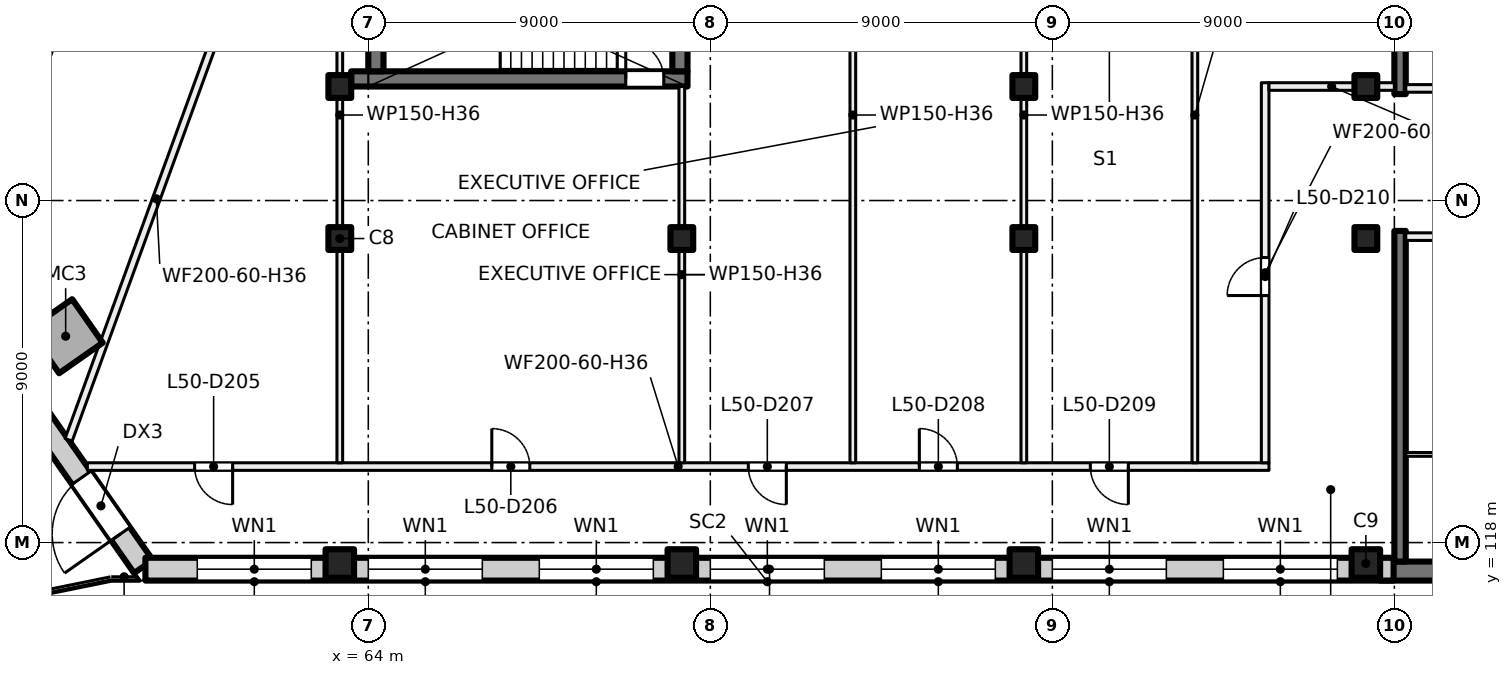
"""IFC4 building model, lengths in metres.
Left out: names, types, materials, properties, quantities, classifications, styles, units other than length and angle.
Written with IfcOpenShell. Run it as: python <this file> out.ifc"""

import sys

from ifc_helpers import new_model, si_unit, direction, frame, frame_2d, origin, origin_2d, place, context, subcontext, project, spatial, rectangle, hollow_rectangle, extrude, element, fill, save


model = new_model("IFC4")
c1 = context("Model", 3, precision=1e-05, world=origin(), true_north=direction((0.0, 1.0)))
c2 = subcontext(c1, "Body", "Model", "MODEL_VIEW")
j1 = project(units=[si_unit("LENGTHUNIT", "METRE"), si_unit("PLANEANGLEUNIT", "RADIAN")], contexts=[c1])
p1 = place(None, origin())
s1 = spatial("IfcSite", under=j1, at=p1, CompositionType="ELEMENT")
p2 = place(p1, origin())
s2 = spatial("IfcBuilding", under=s1, at=p2, CompositionType="ELEMENT")
p3 = place(p2, frame((0.0, 0.0, 212.0)))
s3 = spatial("IfcBuildingStorey", under=s2, at=p3, CompositionType="ELEMENT", Elevation=212.0)
p4 = place(p3, frame((56.036, 123.43, 0.0), z_axis=(0.0, 0.0, 1.0), x_axis=(0.573576436351, -0.819152044289, 0.0)))
e1 = element("IfcColumn", 1, at=p4, inside=s3, PredefinedType="COLUMN", context=c2, shape_type="SweptSolid", body=[
    extrude(hollow_rectangle(XDim=1.4, YDim=1.4, WallThickness=0.032, at=origin_2d()), origin(), (0.0, 0.0, 1.0), 4.0),
])
for number, where, z_axis, x_axis in (
    (2, (63.25, 130.0, 0.0), (0.0, 0.0, 1.0), (1.0, 0.0, 0.0)),
    (3, (81.25, 130.0, 0.0), (0.0, 0.0, 1.0), (1.0, 0.0, 0.0)),
    (4, (90.25, 130.0, 0.0), (0.0, 0.0, 1.0), (1.0, 0.0, 0.0)),
    (5, (63.25, 126.0, 0.0), (0.0, 0.0, 1.0), (1.0, 0.0, 0.0)),
    (6, (72.25, 126.0, 0.0), (0.0, 0.0, 1.0), (1.0, 0.0, 0.0)),
    (7, (81.25, 126.0, 0.0), (0.0, 0.0, 1.0), (1.0, 0.0, 0.0)),
    (8, (90.25, 126.0, 0.0), (0.0, 0.0, 1.0), (1.0, 0.0, 0.0)),
):
    element("IfcColumn", number, at=place(p3, frame(where, z_axis=z_axis, x_axis=x_axis)), inside=s3, PredefinedType="COLUMN", context=c2, shape_type="SweptSolid", body=[
        extrude(rectangle(XDim=0.6, YDim=0.6, at=origin_2d()), origin(), (0.0, 0.0, 1.0), 4.0),
    ])
for number, where, z_axis, x_axis in (
    (9, (63.25, 117.45, 0.0), (0.0, 0.0, 1.0), (1.0, 0.0, 0.0)),
    (10, (72.25, 117.45, 0.0), (0.0, 0.0, 1.0), (1.0, 0.0, 0.0)),
    (11, (81.25, 117.45, 0.0), (0.0, 0.0, 1.0), (1.0, 0.0, 0.0)),
    (12, (90.25, 117.45, 0.0), (0.0, 0.0, 1.0), (1.0, 0.0, 0.0)),
):
    element("IfcColumn", number, at=place(p3, frame(where, z_axis=z_axis, x_axis=x_axis)), inside=s3, PredefinedType="COLUMN", context=c2, shape_type="SweptSolid", body=[
        extrude(rectangle(XDim=0.75, YDim=0.75, at=origin_2d()), origin(), (0.0, 0.0, 1.0), 4.0),
    ])
p5 = place(p3, frame((99.6, 117.25, 0.0), z_axis=(0.0, 0.0, 1.0), x_axis=(-1.0, 0.0, 0.0)))
e13 = element("IfcWall", 13, at=p5, inside=s3, PredefinedType="SHEAR", context=c2, shape_type="SweptSolid", body=[
    extrude(rectangle(XDim=8.975, YDim=0.5, at=frame_2d((4.488, 0.0))), origin(), (0.0, 0.0, 1.0), 4.0),
])
for number, where, z_axis, x_axis in (
    (14, (91.15, 138.5, 0.0), (0.0, 0.0, 1.0), (0.0, -1.0, 0.0)),
    (15, (91.15, 126.2, 0.0), (0.0, 0.0, 1.0), (0.0, -1.0, 0.0)),
):
    element("IfcWall", number, at=place(p3, frame(where, z_axis=z_axis, x_axis=x_axis)), inside=s3, PredefinedType="SHEAR", context=c2, shape_type="SweptSolid", body=[
        extrude(rectangle(XDim=8.7, YDim=0.3, at=frame_2d((4.35, 0.0))), origin(), (0.0, 0.0, 1.0), 4.0),
    ])
p6 = place(p3, frame((63.55, 130.2, 0.0), z_axis=(0.0, 0.0, 1.0), x_axis=(1.0, 0.0, 0.0)))
e16 = element("IfcWall", 16, at=p6, inside=s3, PredefinedType="SHEAR", context=c2, shape_type="SweptSolid", body=[
    extrude(rectangle(XDim=8.85, YDim=0.4, at=frame_2d((4.425, 0.0))), origin(), (0.0, 0.0, 1.0), 4.0),
])
p7 = place(p6, frame((7.225, 0.0, 0.0)))
e17 = element("IfcOpeningElement", 17, at=p7, cuts=e16, PredefinedType="OPENING", context=c2, shape_type="SweptSolid", body=[
    extrude(rectangle(XDim=1.0, YDim=2.1, at=frame_2d((0.5, 1.05))), frame((0.0, 0.21, 0.0), z_axis=(0.0, -1.0, 0.0), x_axis=(1.0, 0.0, 0.0)), (0.0, 0.0, 1.0), 0.42),
])
for number, where, z_axis, x_axis in (
    (18, (64.2, 130.4, 0.0), (0.0, 0.0, 1.0), (0.0, 1.0, 0.0)),
    (19, (72.2, 130.4, 0.0), (0.0, 0.0, 1.0), (0.0, 1.0, 0.0)),
):
    element("IfcWall", number, at=place(p3, frame(where, z_axis=z_axis, x_axis=x_axis)), inside=s3, PredefinedType="SHEAR", context=c2, shape_type="SweptSolid", body=[
        extrude(rectangle(XDim=3.0, YDim=0.4, at=frame_2d((1.5, 0.0))), origin(), (0.0, 0.0, 1.0), 4.0),
    ])
p8 = place(p3, frame((58.083, 117.369, 0.0), z_axis=(0.0, 0.0, 1.0), x_axis=(-0.573573095716, 0.819154383416, 0.0)))
e20 = element("IfcWall", 20, at=p8, inside=s3, PredefinedType="SOLIDWALL", context=c2, shape_type="SweptSolid", body=[
    extrude(rectangle(XDim=26.037, YDim=0.6, at=frame_2d((13.019, 0.0))), origin(), (0.0, 0.0, 1.0), 3.625),
])
p9 = place(p8, frame((1.05, 0.0, 0.0)))
e21 = element("IfcOpeningElement", 21, at=p9, cuts=e20, PredefinedType="OPENING", context=c2, shape_type="SweptSolid", body=[
    extrude(rectangle(XDim=1.8, YDim=2.4, at=frame_2d((0.9, 1.2))), frame((0.0, 0.31, 0.0), z_axis=(0.0, -1.0, 0.0), x_axis=(1.0, 0.0, 0.0)), (0.0, 0.0, 1.0), 0.62),
])
p10 = place(p8, frame((4.829, 0.0, 0.9)))
e22 = element("IfcOpeningElement", 22, at=p10, cuts=e20, PredefinedType="OPENING", context=c2, shape_type="SweptSolid", body=[
    extrude(rectangle(XDim=3.0, YDim=2.4, at=frame_2d((1.5, 1.2))), frame((0.0, 0.31, 0.0), z_axis=(0.0, -1.0, 0.0), x_axis=(1.0, 0.0, 0.0)), (0.0, 0.0, 1.0), 0.62),
])
p11 = place(p8, frame((9.209, 0.0, 0.9)))
e23 = element("IfcOpeningElement", 23, at=p11, cuts=e20, PredefinedType="OPENING", context=c2, shape_type="SweptSolid", body=[
    extrude(rectangle(XDim=3.0, YDim=2.4, at=frame_2d((1.5, 1.2))), frame((0.0, 0.31, 0.0), z_axis=(0.0, -1.0, 0.0), x_axis=(1.0, 0.0, 0.0)), (0.0, 0.0, 1.0), 0.62),
])
p12 = place(p8, frame((13.588, 0.0, 0.9)))
e24 = element("IfcOpeningElement", 24, at=p12, cuts=e20, PredefinedType="OPENING", context=c2, shape_type="SweptSolid", body=[
    extrude(rectangle(XDim=3.0, YDim=2.4, at=frame_2d((1.5, 1.2))), frame((0.0, 0.31, 0.0), z_axis=(0.0, -1.0, 0.0), x_axis=(1.0, 0.0, 0.0)), (0.0, 0.0, 1.0), 0.62),
])
p13 = place(p8, frame((17.968, 0.0, 0.9)))
e25 = element("IfcOpeningElement", 25, at=p13, cuts=e20, PredefinedType="OPENING", context=c2, shape_type="SweptSolid", body=[
    extrude(rectangle(XDim=3.0, YDim=2.4, at=frame_2d((1.5, 1.2))), frame((0.0, 0.31, 0.0), z_axis=(0.0, -1.0, 0.0), x_axis=(1.0, 0.0, 0.0)), (0.0, 0.0, 1.0), 0.62),
])
p14 = place(p8, frame((22.198, 0.0, 0.9)))
e26 = element("IfcOpeningElement", 26, at=p14, cuts=e20, PredefinedType="OPENING", context=c2, shape_type="SweptSolid", body=[
    extrude(rectangle(XDim=3.0, YDim=2.4, at=frame_2d((1.5, 1.2))), frame((0.0, 0.31, 0.0), z_axis=(0.0, -1.0, 0.0), x_axis=(1.0, 0.0, 0.0)), (0.0, 0.0, 1.0), 0.62),
])
p15 = place(p3, frame((90.98, 117.3, 0.0), z_axis=(0.0, 0.0, 1.0), x_axis=(-1.0, 0.0, 0.0)))
e27 = element("IfcWall", 27, at=p15, inside=s3, PredefinedType="SOLIDWALL", context=c2, shape_type="SweptSolid", body=[
    extrude(rectangle(XDim=32.845, YDim=0.6, at=frame_2d((16.422, 0.0))), origin(), (0.0, 0.0, 1.0), 3.625),
])
p16 = place(p15, frame((1.48, 0.0, 0.9)))
e28 = element("IfcOpeningElement", 28, at=p16, cuts=e27, PredefinedType="OPENING", context=c2, shape_type="SweptSolid", body=[
    extrude(rectangle(XDim=3.0, YDim=2.4, at=frame_2d((1.5, 1.2))), frame((0.0, 0.31, 0.0), z_axis=(0.0, -1.0, 0.0), x_axis=(1.0, 0.0, 0.0)), (0.0, 0.0, 1.0), 0.62),
])
p17 = place(p15, frame((5.98, 0.0, 0.9)))
e29 = element("IfcOpeningElement", 29, at=p17, cuts=e27, PredefinedType="OPENING", context=c2, shape_type="SweptSolid", body=[
    extrude(rectangle(XDim=3.0, YDim=2.4, at=frame_2d((1.5, 1.2))), frame((0.0, 0.31, 0.0), z_axis=(0.0, -1.0, 0.0), x_axis=(1.0, 0.0, 0.0)), (0.0, 0.0, 1.0), 0.62),
])
p18 = place(p15, frame((10.48, 0.0, 0.9)))
e30 = element("IfcOpeningElement", 30, at=p18, cuts=e27, PredefinedType="OPENING", context=c2, shape_type="SweptSolid", body=[
    extrude(rectangle(XDim=3.0, YDim=2.4, at=frame_2d((1.5, 1.2))), frame((0.0, 0.31, 0.0), z_axis=(0.0, -1.0, 0.0), x_axis=(1.0, 0.0, 0.0)), (0.0, 0.0, 1.0), 0.62),
])
p19 = place(p15, frame((14.98, 0.0, 0.9)))
e31 = element("IfcOpeningElement", 31, at=p19, cuts=e27, PredefinedType="OPENING", context=c2, shape_type="SweptSolid", body=[
    extrude(rectangle(XDim=3.0, YDim=2.4, at=frame_2d((1.5, 1.2))), frame((0.0, 0.31, 0.0), z_axis=(0.0, -1.0, 0.0), x_axis=(1.0, 0.0, 0.0)), (0.0, 0.0, 1.0), 0.62),
])
p20 = place(p15, frame((19.48, 0.0, 0.9)))
e32 = element("IfcOpeningElement", 32, at=p20, cuts=e27, PredefinedType="OPENING", context=c2, shape_type="SweptSolid", body=[
    extrude(rectangle(XDim=3.0, YDim=2.4, at=frame_2d((1.5, 1.2))), frame((0.0, 0.31, 0.0), z_axis=(0.0, -1.0, 0.0), x_axis=(1.0, 0.0, 0.0)), (0.0, 0.0, 1.0), 0.62),
])
p21 = place(p15, frame((23.98, 0.0, 0.9)))
e33 = element("IfcOpeningElement", 33, at=p21, cuts=e27, PredefinedType="OPENING", context=c2, shape_type="SweptSolid", body=[
    extrude(rectangle(XDim=3.0, YDim=2.4, at=frame_2d((1.5, 1.2))), frame((0.0, 0.31, 0.0), z_axis=(0.0, -1.0, 0.0), x_axis=(1.0, 0.0, 0.0)), (0.0, 0.0, 1.0), 0.62),
])
p22 = place(p15, frame((28.48, 0.0, 0.9)))
e34 = element("IfcOpeningElement", 34, at=p22, cuts=e27, PredefinedType="OPENING", context=c2, shape_type="SweptSolid", body=[
    extrude(rectangle(XDim=3.0, YDim=2.4, at=frame_2d((1.5, 1.2))), frame((0.0, 0.31, 0.0), z_axis=(0.0, -1.0, 0.0), x_axis=(1.0, 0.0, 0.0)), (0.0, 0.0, 1.0), 0.62),
])
p23 = place(p3, frame((95.25, 126.05, 0.0), z_axis=(0.0, 0.0, 1.0), x_axis=(-1.0, 0.0, 0.0)))
e35 = element("IfcWall", 35, at=p23, inside=s3, PredefinedType="PARTITIONING", context=c2, shape_type="SweptSolid", body=[
    extrude(rectangle(XDim=3.95, YDim=0.2, at=frame_2d((1.975, 0.0))), origin(), (0.0, 0.0, 1.0), 3.625),
])
p24 = place(p23, frame((0.3, 0.0, 0.0)))
e36 = element("IfcOpeningElement", 36, at=p24, cuts=e35, PredefinedType="OPENING", context=c2, shape_type="SweptSolid", body=[
    extrude(rectangle(XDim=1.2, YDim=2.1, at=frame_2d((0.6, 1.05))), frame((0.0, 0.11, 0.0), z_axis=(0.0, -1.0, 0.0), x_axis=(1.0, 0.0, 0.0)), (0.0, 0.0, 1.0), 0.22),
])
p25 = place(p3, frame((93.4, 120.32, 0.0), z_axis=(0.0, 0.0, 1.0), x_axis=(-1.0, 0.0, 0.0)))
e37 = element("IfcWall", 37, at=p25, inside=s3, PredefinedType="PARTITIONING", context=c2, shape_type="SweptSolid", body=[
    extrude(rectangle(XDim=2.1, YDim=0.1, at=frame_2d((1.05, 0.0))), origin(), (0.0, 0.0, 1.0), 3.625),
])
p26 = place(p3, frame((91.3, 129.95, 0.0), z_axis=(0.0, 0.0, 1.0), x_axis=(1.0, 0.0, 0.0)))
e38 = element("IfcWall", 38, at=p26, inside=s3, PredefinedType="PARTITIONING", context=c2, shape_type="SweptSolid", body=[
    extrude(rectangle(XDim=3.95, YDim=0.2, at=frame_2d((1.975, 0.0))), origin(), (0.0, 0.0, 1.0), 3.625),
])
p27 = place(p26, frame((2.45, 0.0, 0.0)))
e39 = element("IfcOpeningElement", 39, at=p27, cuts=e38, PredefinedType="OPENING", context=c2, shape_type="SweptSolid", body=[
    extrude(rectangle(XDim=1.2, YDim=2.1, at=frame_2d((0.6, 1.05))), frame((0.0, 0.11, 0.0), z_axis=(0.0, -1.0, 0.0), x_axis=(1.0, 0.0, 0.0)), (0.0, 0.0, 1.0), 0.22),
])
p28 = place(p3, frame((53.314, 124.703, 0.0), z_axis=(0.0, 0.0, 1.0), x_axis=(0.341964791562, 0.939712765334, 0.0)))
e40 = element("IfcWall", 40, at=p28, inside=s3, PredefinedType="PARTITIONING", context=c2, shape_type="SweptSolid", body=[
    extrude(rectangle(XDim=10.697, YDim=0.2, at=frame_2d((5.348, 0.0))), origin(), (0.0, 0.0, 1.0), 2.725),
])
p29 = place(p3, frame((56.114, 120.704, 0.0), z_axis=(0.0, 0.0, 1.0), x_axis=(0.342069822002, 0.939674537739, 0.0)))
e41 = element("IfcWall", 41, at=p29, inside=s3, PredefinedType="PARTITIONING", context=c2, shape_type="SweptSolid", body=[
    extrude(rectangle(XDim=13.497, YDim=0.2, at=frame_2d((6.749, 0.0))), origin(), (0.0, 0.0, 1.0), 3.625),
])
p30 = place(p3, frame((56.607, 120.0, 0.0), z_axis=(0.0, 0.0, 1.0), x_axis=(1.0, 0.0, 0.0)))
e42 = element("IfcWall", 42, at=p30, inside=s3, PredefinedType="PARTITIONING", context=c2, shape_type="SweptSolid", body=[
    extrude(rectangle(XDim=31.093, YDim=0.2, at=frame_2d((15.546, 0.0))), origin(), (0.0, 0.0, 1.0), 3.625),
])
p31 = place(p30, frame((2.823, 0.0, 0.0)))
e43 = element("IfcOpeningElement", 43, at=p31, cuts=e42, PredefinedType="OPENING", context=c2, shape_type="SweptSolid", body=[
    extrude(rectangle(XDim=1.0, YDim=2.1, at=frame_2d((0.5, 1.05))), frame((0.0, 0.11, 0.0), z_axis=(0.0, -1.0, 0.0), x_axis=(1.0, 0.0, 0.0)), (0.0, 0.0, 1.0), 0.22),
])
p32 = place(p30, frame((10.643, 0.0, 0.0)))
e44 = element("IfcOpeningElement", 44, at=p32, cuts=e42, PredefinedType="OPENING", context=c2, shape_type="SweptSolid", body=[
    extrude(rectangle(XDim=1.0, YDim=2.1, at=frame_2d((0.5, 1.05))), frame((0.0, 0.11, 0.0), z_axis=(0.0, -1.0, 0.0), x_axis=(1.0, 0.0, 0.0)), (0.0, 0.0, 1.0), 0.22),
])
p33 = place(p30, frame((17.393, 0.0, 0.0)))
e45 = element("IfcOpeningElement", 45, at=p33, cuts=e42, PredefinedType="OPENING", context=c2, shape_type="SweptSolid", body=[
    extrude(rectangle(XDim=1.0, YDim=2.1, at=frame_2d((0.5, 1.05))), frame((0.0, 0.11, 0.0), z_axis=(0.0, -1.0, 0.0), x_axis=(1.0, 0.0, 0.0)), (0.0, 0.0, 1.0), 0.22),
])
p34 = place(p30, frame((21.893, 0.0, 0.0)))
e46 = element("IfcOpeningElement", 46, at=p34, cuts=e42, PredefinedType="OPENING", context=c2, shape_type="SweptSolid", body=[
    extrude(rectangle(XDim=1.0, YDim=2.1, at=frame_2d((0.5, 1.05))), frame((0.0, 0.11, 0.0), z_axis=(0.0, -1.0, 0.0), x_axis=(1.0, 0.0, 0.0)), (0.0, 0.0, 1.0), 0.22),
])
p35 = place(p30, frame((26.393, 0.0, 0.0)))
e47 = element("IfcOpeningElement", 47, at=p35, cuts=e42, PredefinedType="OPENING", context=c2, shape_type="SweptSolid", body=[
    extrude(rectangle(XDim=1.0, YDim=2.1, at=frame_2d((0.5, 1.05))), frame((0.0, 0.11, 0.0), z_axis=(0.0, -1.0, 0.0), x_axis=(1.0, 0.0, 0.0)), (0.0, 0.0, 1.0), 0.22),
])
p36 = place(p3, frame((63.25, 120.1, 0.0), z_axis=(0.0, 0.0, 1.0), x_axis=(0.0, 1.0, 0.0)))
e48 = element("IfcWall", 48, at=p36, inside=s3, PredefinedType="PARTITIONING", context=c2, shape_type="SweptSolid", body=[
    extrude(rectangle(XDim=18.3, YDim=0.15, at=frame_2d((9.15, 0.0))), origin(), (0.0, 0.0, 1.0), 3.625),
])
p37 = place(p3, frame((72.25, 120.1, 0.0), z_axis=(0.0, 0.0, 1.0), x_axis=(0.0, 1.0, 0.0)))
e49 = element("IfcWall", 49, at=p37, inside=s3, PredefinedType="PARTITIONING", context=c2, shape_type="SweptSolid", body=[
    extrude(rectangle(XDim=9.9, YDim=0.15, at=frame_2d((4.95, 0.0))), origin(), (0.0, 0.0, 1.0), 3.625),
])
for number, where, z_axis, x_axis in (
    (50, (76.75, 120.1, 0.0), (0.0, 0.0, 1.0), (0.0, 1.0, 0.0)),
    (51, (81.25, 120.1, 0.0), (0.0, 0.0, 1.0), (0.0, 1.0, 0.0)),
    (52, (85.75, 120.1, 0.0), (0.0, 0.0, 1.0), (0.0, 1.0, 0.0)),
):
    element("IfcWall", number, at=place(p3, frame(where, z_axis=z_axis, x_axis=x_axis)), inside=s3, PredefinedType="PARTITIONING", context=c2, shape_type="SweptSolid", body=[
        extrude(rectangle(XDim=18.3, YDim=0.15, at=frame_2d((9.15, 0.0))), origin(), (0.0, 0.0, 1.0), 3.625),
    ])
p38 = place(p3, frame((87.6, 120.1, 0.0), z_axis=(0.0, 0.0, 1.0), x_axis=(0.0, 1.0, 0.0)))
e53 = element("IfcWall", 53, at=p38, inside=s3, PredefinedType="PARTITIONING", context=c2, shape_type="SweptSolid", body=[
    extrude(rectangle(XDim=10.0, YDim=0.2, at=frame_2d((5.0, 0.0))), origin(), (0.0, 0.0, 1.0), 3.625),
])
p39 = place(p38, frame((4.4, 0.0, 0.0)))
e54 = element("IfcOpeningElement", 54, at=p39, cuts=e53, PredefinedType="OPENING", context=c2, shape_type="SweptSolid", body=[
    extrude(rectangle(XDim=1.0, YDim=2.1, at=frame_2d((0.5, 1.05))), frame((0.0, 0.11, 0.0), z_axis=(0.0, -1.0, 0.0), x_axis=(1.0, 0.0, 0.0)), (0.0, 0.0, 1.0), 0.22),
])
p40 = place(p3, frame((87.7, 130.0, 0.0), z_axis=(0.0, 0.0, 1.0), x_axis=(1.0, 0.0, 0.0)))
e55 = element("IfcWall", 55, at=p40, inside=s3, PredefinedType="PARTITIONING", context=c2, shape_type="SweptSolid", body=[
    extrude(rectangle(XDim=3.3, YDim=0.2, at=frame_2d((1.65, 0.0))), origin(), (0.0, 0.0, 1.0), 3.625),
])
p41 = place(p9, origin())
e56 = element("IfcDoor", 56, at=p41, inside=s3, OperationType="DOUBLE_DOOR_SINGLE_SWING", PredefinedType="DOOR", context=c2, shape_type="SweptSolid", body=[
    extrude(rectangle(XDim=1.8, YDim=2.4, at=frame_2d((0.9, 1.2))), frame((0.0, 0.025, 0.0), z_axis=(0.0, -1.0, 0.0), x_axis=(1.0, 0.0, 0.0)), (0.0, 0.0, 1.0), 0.05),
])
fill(e21, e56)
p42 = place(p16, origin())
e57 = element("IfcWindow", 57, at=p42, inside=s3, PartitioningType="SINGLE_PANEL", PredefinedType="WINDOW", context=c2, shape_type="SweptSolid", body=[
    extrude(rectangle(XDim=3.0, YDim=2.4, at=frame_2d((1.5, 1.2))), frame((0.0, 0.03, 0.0), z_axis=(0.0, -1.0, 0.0), x_axis=(1.0, 0.0, 0.0)), (0.0, 0.0, 1.0), 0.06),
])
fill(e28, e57)
p43 = place(p17, origin())
e58 = element("IfcWindow", 58, at=p43, inside=s3, PartitioningType="SINGLE_PANEL", PredefinedType="WINDOW", context=c2, shape_type="SweptSolid", body=[
    extrude(rectangle(XDim=3.0, YDim=2.4, at=frame_2d((1.5, 1.2))), frame((0.0, 0.03, 0.0), z_axis=(0.0, -1.0, 0.0), x_axis=(1.0, 0.0, 0.0)), (0.0, 0.0, 1.0), 0.06),
])
fill(e29, e58)
p44 = place(p18, origin())
e59 = element("IfcWindow", 59, at=p44, inside=s3, PartitioningType="SINGLE_PANEL", PredefinedType="WINDOW", context=c2, shape_type="SweptSolid", body=[
    extrude(rectangle(XDim=3.0, YDim=2.4, at=frame_2d((1.5, 1.2))), frame((0.0, 0.03, 0.0), z_axis=(0.0, -1.0, 0.0), x_axis=(1.0, 0.0, 0.0)), (0.0, 0.0, 1.0), 0.06),
])
fill(e30, e59)
p45 = place(p19, origin())
e60 = element("IfcWindow", 60, at=p45, inside=s3, PartitioningType="SINGLE_PANEL", PredefinedType="WINDOW", context=c2, shape_type="SweptSolid", body=[
    extrude(rectangle(XDim=3.0, YDim=2.4, at=frame_2d((1.5, 1.2))), frame((0.0, 0.03, 0.0), z_axis=(0.0, -1.0, 0.0), x_axis=(1.0, 0.0, 0.0)), (0.0, 0.0, 1.0), 0.06),
])
fill(e31, e60)
p46 = place(p20, origin())
e61 = element("IfcWindow", 61, at=p46, inside=s3, PartitioningType="SINGLE_PANEL", PredefinedType="WINDOW", context=c2, shape_type="SweptSolid", body=[
    extrude(rectangle(XDim=3.0, YDim=2.4, at=frame_2d((1.5, 1.2))), frame((0.0, 0.03, 0.0), z_axis=(0.0, -1.0, 0.0), x_axis=(1.0, 0.0, 0.0)), (0.0, 0.0, 1.0), 0.06),
])
fill(e32, e61)
p47 = place(p21, origin())
e62 = element("IfcWindow", 62, at=p47, inside=s3, PartitioningType="SINGLE_PANEL", PredefinedType="WINDOW", context=c2, shape_type="SweptSolid", body=[
    extrude(rectangle(XDim=3.0, YDim=2.4, at=frame_2d((1.5, 1.2))), frame((0.0, 0.03, 0.0), z_axis=(0.0, -1.0, 0.0), x_axis=(1.0, 0.0, 0.0)), (0.0, 0.0, 1.0), 0.06),
])
fill(e33, e62)
p48 = place(p22, origin())
e63 = element("IfcWindow", 63, at=p48, inside=s3, PartitioningType="SINGLE_PANEL", PredefinedType="WINDOW", context=c2, shape_type="SweptSolid", body=[
    extrude(rectangle(XDim=3.0, YDim=2.4, at=frame_2d((1.5, 1.2))), frame((0.0, 0.03, 0.0), z_axis=(0.0, -1.0, 0.0), x_axis=(1.0, 0.0, 0.0)), (0.0, 0.0, 1.0), 0.06),
])
fill(e34, e63)
p49 = place(p7, origin())
e64 = element("IfcDoor", 64, at=p49, inside=s3, OperationType="SINGLE_SWING_LEFT", PredefinedType="DOOR", context=c2, shape_type="SweptSolid", body=[
    extrude(rectangle(XDim=1.0, YDim=2.1, at=frame_2d((0.5, 1.05))), frame((0.0, 0.025, 0.0), z_axis=(0.0, -1.0, 0.0), x_axis=(1.0, 0.0, 0.0)), (0.0, 0.0, 1.0), 0.05),
])
fill(e17, e64)
p50 = place(p31, origin())
e65 = element("IfcDoor", 65, at=p50, inside=s3, OperationType="SINGLE_SWING_RIGHT", PredefinedType="DOOR", context=c2, shape_type="SweptSolid", body=[
    extrude(rectangle(XDim=1.0, YDim=2.1, at=frame_2d((0.5, 1.05))), frame((0.0, 0.025, 0.0), z_axis=(0.0, -1.0, 0.0), x_axis=(1.0, 0.0, 0.0)), (0.0, 0.0, 1.0), 0.05),
])
fill(e43, e65)
p51 = place(p32, origin())
e66 = element("IfcDoor", 66, at=p51, inside=s3, OperationType="SINGLE_SWING_LEFT", PredefinedType="DOOR", context=c2, shape_type="SweptSolid", body=[
    extrude(rectangle(XDim=1.0, YDim=2.1, at=frame_2d((0.5, 1.05))), frame((0.0, 0.025, 0.0), z_axis=(0.0, -1.0, 0.0), x_axis=(1.0, 0.0, 0.0)), (0.0, 0.0, 1.0), 0.05),
])
fill(e44, e66)
p52 = place(p33, origin())
e67 = element("IfcDoor", 67, at=p52, inside=s3, OperationType="SINGLE_SWING_RIGHT", PredefinedType="DOOR", context=c2, shape_type="SweptSolid", body=[
    extrude(rectangle(XDim=1.0, YDim=2.1, at=frame_2d((0.5, 1.05))), frame((0.0, 0.025, 0.0), z_axis=(0.0, -1.0, 0.0), x_axis=(1.0, 0.0, 0.0)), (0.0, 0.0, 1.0), 0.05),
])
fill(e45, e67)
p53 = place(p34, origin())
e68 = element("IfcDoor", 68, at=p53, inside=s3, OperationType="SINGLE_SWING_LEFT", PredefinedType="DOOR", context=c2, shape_type="SweptSolid", body=[
    extrude(rectangle(XDim=1.0, YDim=2.1, at=frame_2d((0.5, 1.05))), frame((0.0, 0.025, 0.0), z_axis=(0.0, -1.0, 0.0), x_axis=(1.0, 0.0, 0.0)), (0.0, 0.0, 1.0), 0.05),
])
fill(e46, e68)
p54 = place(p35, origin())
e69 = element("IfcDoor", 69, at=p54, inside=s3, OperationType="SINGLE_SWING_RIGHT", PredefinedType="DOOR", context=c2, shape_type="SweptSolid", body=[
    extrude(rectangle(XDim=1.0, YDim=2.1, at=frame_2d((0.5, 1.05))), frame((0.0, 0.025, 0.0), z_axis=(0.0, -1.0, 0.0), x_axis=(1.0, 0.0, 0.0)), (0.0, 0.0, 1.0), 0.05),
])
fill(e47, e69)
p55 = place(p39, origin())
e70 = element("IfcDoor", 70, at=p55, inside=s3, OperationType="SINGLE_SWING_LEFT", PredefinedType="DOOR", context=c2, shape_type="SweptSolid", body=[
    extrude(rectangle(XDim=1.0, YDim=2.1, at=frame_2d((0.5, 1.05))), frame((0.0, 0.025, 0.0), z_axis=(0.0, -1.0, 0.0), x_axis=(1.0, 0.0, 0.0)), (0.0, 0.0, 1.0), 0.05),
])
fill(e54, e70)
save(model, sys.argv[1])
